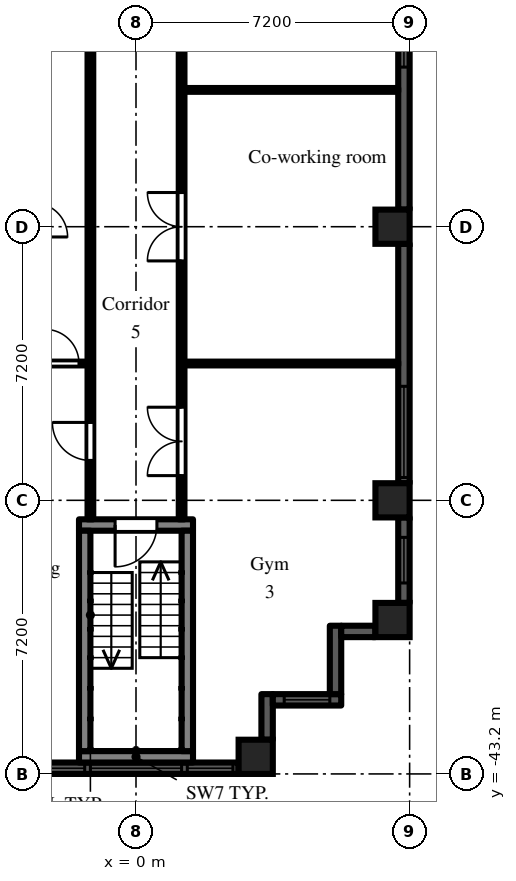
"""IFC4 building model, lengths in metres.
Left out: names, types, materials, properties, quantities, classifications, styles, units other than length and angle.
Written with IfcOpenShell. Run it as: python <this file> out.ifc"""

import sys

from ifc_helpers import new_model, si_unit, direction, frame, frame_2d, origin, origin_2d, place, context, subcontext, project, spatial, rectangle, extrude, element, fill, save


model = new_model("IFC4")
c1 = context("Model", 3, precision=1e-05, world=origin(), true_north=direction((0.0, 1.0)))
c2 = subcontext(c1, "Body", "Model", "MODEL_VIEW")
j1 = project(units=[si_unit("LENGTHUNIT", "METRE"), si_unit("PLANEANGLEUNIT", "RADIAN")], contexts=[c1])
p1 = place(None, origin())
s1 = spatial("IfcSite", under=j1, at=p1, CompositionType="ELEMENT")
p2 = place(p1, origin())
s2 = spatial("IfcBuilding", under=s1, at=p2, CompositionType="ELEMENT")
p3 = place(p2, frame((0.0, 0.0, 75.9)))
s3 = spatial("IfcBuildingStorey", under=s2, at=p3, CompositionType="ELEMENT", Elevation=75.9)
for number, where, z_axis, x_axis in (
    (1, (3.15, -42.75, 0.0), (0.0, 0.0, 1.0), (1.0, 0.0, 0.0)),
    (2, (6.75, -39.15, 0.0), (0.0, 0.0, 1.0), (1.0, 0.0, 0.0)),
    (3, (6.75, -36.0, 0.0), (0.0, 0.0, 1.0), (1.0, 0.0, 0.0)),
    (4, (6.75, -28.8, 0.0), (0.0, 0.0, 1.0), (1.0, 0.0, 0.0)),
):
    element("IfcColumn", number, at=place(p3, frame(where, z_axis=z_axis, x_axis=x_axis)), inside=s3, PredefinedType="COLUMN", context=c2, shape_type="SweptSolid", body=[
        extrude(rectangle(XDim=0.9, YDim=0.9, at=origin_2d()), origin(), (0.0, 0.0, 1.0), 3.0),
    ])
p4 = place(p3, frame((-2.7, -43.05, 0.0), z_axis=(0.0, 0.0, 1.0), x_axis=(1.0, 0.0, 0.0)))
e5 = element("IfcWall", 5, at=p4, inside=s3, PredefinedType="SOLIDWALL", context=c2, shape_type="SweptSolid", body=[
    extrude(rectangle(XDim=5.4, YDim=0.3, at=frame_2d((2.7, 0.0))), origin(), (0.0, 0.0, 1.0), 2.1),
])
p5 = place(p4, frame((1.5, 0.0, 0.2)))
e6 = element("IfcOpeningElement", 6, at=p5, cuts=e5, PredefinedType="OPENING", context=c2, shape_type="SweptSolid", body=[
    extrude(rectangle(XDim=2.4, YDim=1.85, at=frame_2d((1.2, 0.925))), frame((0.0, 0.16, 0.0), z_axis=(0.0, -1.0, 0.0), x_axis=(1.0, 0.0, 0.0)), (0.0, 0.0, 1.0), 0.32),
])
p6 = place(p4, frame((0.15, 0.0, 0.2)))
e7 = element("IfcOpeningElement", 7, at=p6, cuts=e5, PredefinedType="OPENING", context=c2, shape_type="SweptSolid", body=[
    extrude(rectangle(XDim=1.2, YDim=1.85, at=frame_2d((0.6, 0.925))), frame((0.0, 0.16, 0.0), z_axis=(0.0, -1.0, 0.0), x_axis=(1.0, 0.0, 0.0)), (0.0, 0.0, 1.0), 0.32),
])
p7 = place(p4, frame((4.05, 0.0, 0.2)))
e8 = element("IfcOpeningElement", 8, at=p7, cuts=e5, PredefinedType="OPENING", context=c2, shape_type="SweptSolid", body=[
    extrude(rectangle(XDim=1.2, YDim=1.85, at=frame_2d((0.6, 0.925))), frame((0.0, 0.16, 0.0), z_axis=(0.0, -1.0, 0.0), x_axis=(1.0, 0.0, 0.0)), (0.0, 0.0, 1.0), 0.32),
])
p8 = place(p3, frame((3.45, -42.3, 0.0), z_axis=(0.0, 0.0, 1.0), x_axis=(0.0, 1.0, 0.0)))
e9 = element("IfcWall", 9, at=p8, inside=s3, PredefinedType="SOLIDWALL", context=c2, shape_type="SweptSolid", body=[
    extrude(rectangle(XDim=1.2, YDim=0.3, at=frame_2d((0.6, 0.0))), origin(), (0.0, 0.0, 1.0), 2.575),
])
p9 = place(p3, frame((3.6, -41.25, 0.0), z_axis=(0.0, 0.0, 1.0), x_axis=(1.0, 0.0, 0.0)))
e10 = element("IfcWall", 10, at=p9, inside=s3, PredefinedType="SOLIDWALL", context=c2, shape_type="SweptSolid", body=[
    extrude(rectangle(XDim=1.8, YDim=0.3, at=frame_2d((0.9, 0.0))), origin(), (0.0, 0.0, 1.0), 2.575),
])
p10 = place(p9, frame((0.3, 0.0, 0.2)))
e11 = element("IfcOpeningElement", 11, at=p10, cuts=e10, PredefinedType="OPENING", context=c2, shape_type="SweptSolid", body=[
    extrude(rectangle(XDim=1.2, YDim=1.85, at=frame_2d((0.6, 0.925))), frame((0.0, 0.16, 0.0), z_axis=(0.0, -1.0, 0.0), x_axis=(1.0, 0.0, 0.0)), (0.0, 0.0, 1.0), 0.32),
])
p11 = place(p3, frame((5.25, -41.1, 0.0), z_axis=(0.0, 0.0, 1.0), x_axis=(0.0, 1.0, 0.0)))
e12 = element("IfcWall", 12, at=p11, inside=s3, PredefinedType="SOLIDWALL", context=c2, shape_type="SweptSolid", body=[
    extrude(rectangle(XDim=1.8, YDim=0.3, at=frame_2d((0.9, 0.0))), origin(), (0.0, 0.0, 1.0), 2.575),
])
p12 = place(p3, frame((5.4, -39.45, 0.0), z_axis=(0.0, 0.0, 1.0), x_axis=(1.0, 0.0, 0.0)))
e13 = element("IfcWall", 13, at=p12, inside=s3, PredefinedType="SOLIDWALL", context=c2, shape_type="SweptSolid", body=[
    extrude(rectangle(XDim=0.9, YDim=0.3, at=frame_2d((0.45, 0.0))), origin(), (0.0, 0.0, 1.0), 2.575),
])
p13 = place(p3, frame((7.05, -38.7, 0.0), z_axis=(0.0, 0.0, 1.0), x_axis=(0.0, 1.0, 0.0)))
e14 = element("IfcWall", 14, at=p13, inside=s3, PredefinedType="SOLIDWALL", context=c2, shape_type="SweptSolid", body=[
    extrude(rectangle(XDim=2.25, YDim=0.3, at=frame_2d((1.125, 0.0))), origin(), (0.0, 0.0, 1.0), 2.1),
])
p14 = place(p13, frame((0.525, 0.0, 0.2)))
e15 = element("IfcOpeningElement", 15, at=p14, cuts=e14, PredefinedType="OPENING", context=c2, shape_type="SweptSolid", body=[
    extrude(rectangle(XDim=1.2, YDim=1.85, at=frame_2d((0.6, 0.925))), frame((0.0, 0.16, 0.0), z_axis=(0.0, -1.0, 0.0), x_axis=(1.0, 0.0, 0.0)), (0.0, 0.0, 1.0), 0.32),
])
p15 = place(p3, frame((7.05, -35.55, 0.0), z_axis=(0.0, 0.0, 1.0), x_axis=(0.0, 1.0, 0.0)))
e16 = element("IfcWall", 16, at=p15, inside=s3, PredefinedType="SOLIDWALL", context=c2, shape_type="SweptSolid", body=[
    extrude(rectangle(XDim=6.3, YDim=0.3, at=frame_2d((3.15, 0.0))), origin(), (0.0, 0.0, 1.0), 2.1),
])
p16 = place(p15, frame((0.15, 0.0, 0.2)))
e17 = element("IfcOpeningElement", 17, at=p16, cuts=e16, PredefinedType="OPENING", context=c2, shape_type="SweptSolid", body=[
    extrude(rectangle(XDim=2.4, YDim=1.85, at=frame_2d((1.2, 0.925))), frame((0.0, 0.16, 0.0), z_axis=(0.0, -1.0, 0.0), x_axis=(1.0, 0.0, 0.0)), (0.0, 0.0, 1.0), 0.32),
])
p17 = place(p3, frame((7.05, -28.35, 0.0), z_axis=(0.0, 0.0, 1.0), x_axis=(0.0, 1.0, 0.0)))
e18 = element("IfcWall", 18, at=p17, inside=s3, PredefinedType="SOLIDWALL", context=c2, shape_type="SweptSolid", body=[
    extrude(rectangle(XDim=6.3, YDim=0.3, at=frame_2d((3.15, 0.0))), origin(), (0.0, 0.0, 1.0), 2.1),
])
p18 = place(p17, frame((3.75, 0.0, 0.2)))
e19 = element("IfcOpeningElement", 19, at=p18, cuts=e18, PredefinedType="OPENING", context=c2, shape_type="SweptSolid", body=[
    extrude(rectangle(XDim=2.4, YDim=1.85, at=frame_2d((1.2, 0.925))), frame((0.0, 0.16, 0.0), z_axis=(0.0, -1.0, 0.0), x_axis=(1.0, 0.0, 0.0)), (0.0, 0.0, 1.0), 0.32),
])
p19 = place(p3, frame((-1.5, -36.65, 0.0), z_axis=(0.0, 0.0, 1.0), x_axis=(1.0, 0.0, 0.0)))
e20 = element("IfcWall", 20, at=p19, inside=s3, PredefinedType="SHEAR", context=c2, shape_type="SweptSolid", body=[
    extrude(rectangle(XDim=3.0, YDim=0.3, at=frame_2d((1.5, 0.0))), origin(), (0.0, 0.0, 1.0), 2.575),
])
p20 = place(p19, frame((0.95, 0.0, 0.0)))
e21 = element("IfcOpeningElement", 21, at=p20, cuts=e20, PredefinedType="OPENING", context=c2, shape_type="SweptSolid", body=[
    extrude(rectangle(XDim=1.1, YDim=2.1, at=frame_2d((0.55, 1.05))), frame((0.0, 0.16, 0.0), z_axis=(0.0, -1.0, 0.0), x_axis=(1.0, 0.0, 0.0)), (0.0, 0.0, 1.0), 0.32),
])
p21 = place(p3, frame((-1.5, -42.75, 0.0), z_axis=(0.0, 0.0, 1.0), x_axis=(1.0, 0.0, 0.0)))
e22 = element("IfcWall", 22, at=p21, inside=s3, PredefinedType="SHEAR", context=c2, shape_type="SweptSolid", body=[
    extrude(rectangle(XDim=3.0, YDim=0.3, at=frame_2d((1.5, 0.0))), origin(), (0.0, 0.0, 1.0), 2.575),
])
for number, where, z_axis, x_axis in (
    (23, (-1.35, -36.8, 0.0), (0.0, 0.0, 1.0), (0.0, -1.0, 0.0)),
    (24, (1.35, -36.8, 0.0), (0.0, 0.0, 1.0), (0.0, -1.0, 0.0)),
):
    element("IfcWall", number, at=place(p3, frame(where, z_axis=z_axis, x_axis=x_axis)), inside=s3, PredefinedType="SHEAR", context=c2, shape_type="SweptSolid", body=[
        extrude(rectangle(XDim=5.8, YDim=0.3, at=frame_2d((2.9, 0.0))), origin(), (0.0, 0.0, 1.0), 2.575),
    ])
p22 = place(p3, frame((-6.9, -32.4, 0.0), z_axis=(0.0, 0.0, 1.0), x_axis=(1.0, 0.0, 0.0)))
e25 = element("IfcWall", 25, at=p22, inside=s3, PredefinedType="PARTITIONING", context=c2, shape_type="SweptSolid", body=[
    extrude(rectangle(XDim=5.625, YDim=0.1, at=frame_2d((2.812, 0.0))), origin(), (0.0, 0.0, 1.0), 2.575),
])
p23 = place(p22, frame((4.5, 0.0, 0.0)))
e26 = element("IfcOpeningElement", 26, at=p23, cuts=e25, PredefinedType="OPENING", context=c2, shape_type="SweptSolid", body=[
    extrude(rectangle(XDim=0.9, YDim=2.1, at=frame_2d((0.45, 1.05))), frame((0.0, 0.06, 0.0), z_axis=(0.0, -1.0, 0.0), x_axis=(1.0, 0.0, 0.0)), (0.0, 0.0, 1.0), 0.12),
])
p24 = place(p3, frame((-1.2, -36.5, 0.0), z_axis=(0.0, 0.0, 1.0), x_axis=(0.0, 1.0, 0.0)))
e27 = element("IfcWall", 27, at=p24, inside=s3, PredefinedType="PARTITIONING", context=c2, shape_type="SweptSolid", body=[
    extrude(rectangle(XDim=35.225, YDim=0.15, at=frame_2d((17.613, 0.0))), origin(), (0.0, 0.0, 1.0), 2.575),
])
p25 = place(p24, frame((23.05, 0.0, 0.0)))
e28 = element("IfcOpeningElement", 28, at=p25, cuts=e27, PredefinedType="OPENING", context=c2, shape_type="SweptSolid", body=[
    extrude(rectangle(XDim=0.9, YDim=2.1, at=frame_2d((0.45, 1.05))), frame((0.0, 0.085, 0.0), z_axis=(0.0, -1.0, 0.0), x_axis=(1.0, 0.0, 0.0)), (0.0, 0.0, 1.0), 0.17),
])
p26 = place(p24, frame((26.65, 0.0, 0.0)))
e29 = element("IfcOpeningElement", 29, at=p26, cuts=e27, PredefinedType="OPENING", context=c2, shape_type="SweptSolid", body=[
    extrude(rectangle(XDim=0.9, YDim=2.1, at=frame_2d((0.45, 1.05))), frame((0.0, 0.085, 0.0), z_axis=(0.0, -1.0, 0.0), x_axis=(1.0, 0.0, 0.0)), (0.0, 0.0, 1.0), 0.17),
])
p27 = place(p24, frame((20.75, 0.0, 0.0)))
e30 = element("IfcOpeningElement", 30, at=p27, cuts=e27, PredefinedType="OPENING", context=c2, shape_type="SweptSolid", body=[
    extrude(rectangle(XDim=0.9, YDim=2.1, at=frame_2d((0.45, 1.05))), frame((0.0, 0.085, 0.0), z_axis=(0.0, -1.0, 0.0), x_axis=(1.0, 0.0, 0.0)), (0.0, 0.0, 1.0), 0.17),
])
p28 = place(p24, frame((18.95, 0.0, 0.0)))
e31 = element("IfcOpeningElement", 31, at=p28, cuts=e27, PredefinedType="OPENING", context=c2, shape_type="SweptSolid", body=[
    extrude(rectangle(XDim=0.9, YDim=2.1, at=frame_2d((0.45, 1.05))), frame((0.0, 0.085, 0.0), z_axis=(0.0, -1.0, 0.0), x_axis=(1.0, 0.0, 0.0)), (0.0, 0.0, 1.0), 0.17),
])
p29 = place(p24, frame((1.55, 0.0, 0.0)))
e32 = element("IfcOpeningElement", 32, at=p29, cuts=e27, PredefinedType="OPENING", context=c2, shape_type="SweptSolid", body=[
    extrude(rectangle(XDim=1.0, YDim=2.1, at=frame_2d((0.5, 1.05))), frame((0.0, 0.085, 0.0), z_axis=(0.0, -1.0, 0.0), x_axis=(1.0, 0.0, 0.0)), (0.0, 0.0, 1.0), 0.17),
])
p30 = place(p3, frame((1.2, -36.5, 0.0), z_axis=(0.0, 0.0, 1.0), x_axis=(0.0, 1.0, 0.0)))
e33 = element("IfcWall", 33, at=p30, inside=s3, PredefinedType="PARTITIONING", context=c2, shape_type="SweptSolid", body=[
    extrude(rectangle(XDim=35.375, YDim=0.15, at=frame_2d((17.688, 0.0))), origin(), (0.0, 0.0, 1.0), 2.575),
])
p31 = place(p30, frame((33.65, 0.0, 0.0)))
e34 = element("IfcOpeningElement", 34, at=p31, cuts=e33, PredefinedType="OPENING", context=c2, shape_type="SweptSolid", body=[
    extrude(rectangle(XDim=0.9, YDim=2.1, at=frame_2d((0.45, 1.05))), frame((0.0, 0.085, 0.0), z_axis=(0.0, -1.0, 0.0), x_axis=(1.0, 0.0, 0.0)), (0.0, 0.0, 1.0), 0.17),
])
p32 = place(p30, frame((30.65, 0.0, 0.0)))
e35 = element("IfcOpeningElement", 35, at=p32, cuts=e33, PredefinedType="OPENING", context=c2, shape_type="SweptSolid", body=[
    extrude(rectangle(XDim=0.9, YDim=2.1, at=frame_2d((0.45, 1.05))), frame((0.0, 0.085, 0.0), z_axis=(0.0, -1.0, 0.0), x_axis=(1.0, 0.0, 0.0)), (0.0, 0.0, 1.0), 0.17),
])
p33 = place(p30, frame((23.05, 0.0, 0.0)))
e36 = element("IfcOpeningElement", 36, at=p33, cuts=e33, PredefinedType="OPENING", context=c2, shape_type="SweptSolid", body=[
    extrude(rectangle(XDim=0.9, YDim=2.1, at=frame_2d((0.45, 1.05))), frame((0.0, 0.085, 0.0), z_axis=(0.0, -1.0, 0.0), x_axis=(1.0, 0.0, 0.0)), (0.0, 0.0, 1.0), 0.17),
])
p34 = place(p30, frame((26.65, 0.0, 0.0)))
e37 = element("IfcOpeningElement", 37, at=p34, cuts=e33, PredefinedType="OPENING", context=c2, shape_type="SweptSolid", body=[
    extrude(rectangle(XDim=0.9, YDim=2.1, at=frame_2d((0.45, 1.05))), frame((0.0, 0.085, 0.0), z_axis=(0.0, -1.0, 0.0), x_axis=(1.0, 0.0, 0.0)), (0.0, 0.0, 1.0), 0.17),
])
p35 = place(p30, frame((20.5, 0.0, 0.0)))
e38 = element("IfcOpeningElement", 38, at=p35, cuts=e33, PredefinedType="OPENING", context=c2, shape_type="SweptSolid", body=[
    extrude(rectangle(XDim=1.0, YDim=2.1, at=frame_2d((0.5, 1.05))), frame((0.0, 0.085, 0.0), z_axis=(0.0, -1.0, 0.0), x_axis=(1.0, 0.0, 0.0)), (0.0, 0.0, 1.0), 0.17),
])
p36 = place(p30, frame((14.0, 0.0, 0.0)))
e39 = element("IfcOpeningElement", 39, at=p36, cuts=e33, PredefinedType="OPENING", context=c2, shape_type="SweptSolid", body=[
    extrude(rectangle(XDim=1.8, YDim=2.1, at=frame_2d((0.9, 1.05))), frame((0.0, 0.085, 0.0), z_axis=(0.0, -1.0, 0.0), x_axis=(1.0, 0.0, 0.0)), (0.0, 0.0, 1.0), 0.17),
])
p37 = place(p30, frame((6.8, 0.0, 0.0)))
e40 = element("IfcOpeningElement", 40, at=p37, cuts=e33, PredefinedType="OPENING", context=c2, shape_type="SweptSolid", body=[
    extrude(rectangle(XDim=1.8, YDim=2.1, at=frame_2d((0.9, 1.05))), frame((0.0, 0.085, 0.0), z_axis=(0.0, -1.0, 0.0), x_axis=(1.0, 0.0, 0.0)), (0.0, 0.0, 1.0), 0.17),
])
p38 = place(p30, frame((1.15, 0.0, 0.0)))
e41 = element("IfcOpeningElement", 41, at=p38, cuts=e33, PredefinedType="OPENING", context=c2, shape_type="SweptSolid", body=[
    extrude(rectangle(XDim=1.8, YDim=2.1, at=frame_2d((0.9, 1.05))), frame((0.0, 0.085, 0.0), z_axis=(0.0, -1.0, 0.0), x_axis=(1.0, 0.0, 0.0)), (0.0, 0.0, 1.0), 0.17),
])
for number, where, z_axis, x_axis in (
    (42, (1.275, -32.4, 0.0), (0.0, 0.0, 1.0), (1.0, 0.0, 0.0)),
    (43, (1.275, -25.2, 0.0), (0.0, 0.0, 1.0), (1.0, 0.0, 0.0)),
):
    element("IfcWall", number, at=place(p3, frame(where, z_axis=z_axis, x_axis=x_axis)), inside=s3, PredefinedType="PARTITIONING", context=c2, shape_type="SweptSolid", body=[
        extrude(rectangle(XDim=5.625, YDim=0.1, at=frame_2d((2.812, 0.0))), origin(), (0.0, 0.0, 1.0), 2.575),
    ])
p39 = place(p5, origin())
e44 = element("IfcWindow", 44, at=p39, inside=s3, PartitioningType="SINGLE_PANEL", PredefinedType="WINDOW", context=c2, shape_type="SweptSolid", body=[
    extrude(rectangle(XDim=2.4, YDim=1.85, at=frame_2d((1.2, 0.925))), frame((0.0, 0.03, 0.0), z_axis=(0.0, -1.0, 0.0), x_axis=(1.0, 0.0, 0.0)), (0.0, 0.0, 1.0), 0.06),
])
fill(e6, e44)
p40 = place(p6, origin())
e45 = element("IfcWindow", 45, at=p40, inside=s3, PartitioningType="SINGLE_PANEL", PredefinedType="WINDOW", context=c2, shape_type="SweptSolid", body=[
    extrude(rectangle(XDim=1.2, YDim=1.85, at=frame_2d((0.6, 0.925))), frame((0.0, 0.03, 0.0), z_axis=(0.0, -1.0, 0.0), x_axis=(1.0, 0.0, 0.0)), (0.0, 0.0, 1.0), 0.06),
])
fill(e7, e45)
p41 = place(p7, origin())
e46 = element("IfcWindow", 46, at=p41, inside=s3, PartitioningType="SINGLE_PANEL", PredefinedType="WINDOW", context=c2, shape_type="SweptSolid", body=[
    extrude(rectangle(XDim=1.2, YDim=1.85, at=frame_2d((0.6, 0.925))), frame((0.0, 0.03, 0.0), z_axis=(0.0, -1.0, 0.0), x_axis=(1.0, 0.0, 0.0)), (0.0, 0.0, 1.0), 0.06),
])
fill(e8, e46)
p42 = place(p10, origin())
e47 = element("IfcWindow", 47, at=p42, inside=s3, PartitioningType="SINGLE_PANEL", PredefinedType="WINDOW", context=c2, shape_type="SweptSolid", body=[
    extrude(rectangle(XDim=1.2, YDim=1.85, at=frame_2d((0.6, 0.925))), frame((0.0, 0.03, 0.0), z_axis=(0.0, -1.0, 0.0), x_axis=(1.0, 0.0, 0.0)), (0.0, 0.0, 1.0), 0.06),
])
fill(e11, e47)
p43 = place(p14, origin())
e48 = element("IfcWindow", 48, at=p43, inside=s3, PartitioningType="SINGLE_PANEL", PredefinedType="WINDOW", context=c2, shape_type="SweptSolid", body=[
    extrude(rectangle(XDim=1.2, YDim=1.85, at=frame_2d((0.6, 0.925))), frame((0.0, 0.03, 0.0), z_axis=(0.0, -1.0, 0.0), x_axis=(1.0, 0.0, 0.0)), (0.0, 0.0, 1.0), 0.06),
])
fill(e15, e48)
p44 = place(p16, origin())
e49 = element("IfcWindow", 49, at=p44, inside=s3, PartitioningType="SINGLE_PANEL", PredefinedType="WINDOW", context=c2, shape_type="SweptSolid", body=[
    extrude(rectangle(XDim=2.4, YDim=1.85, at=frame_2d((1.2, 0.925))), frame((0.0, 0.03, 0.0), z_axis=(0.0, -1.0, 0.0), x_axis=(1.0, 0.0, 0.0)), (0.0, 0.0, 1.0), 0.06),
])
fill(e17, e49)
p45 = place(p18, origin())
e50 = element("IfcWindow", 50, at=p45, inside=s3, PartitioningType="SINGLE_PANEL", PredefinedType="WINDOW", context=c2, shape_type="SweptSolid", body=[
    extrude(rectangle(XDim=2.4, YDim=1.85, at=frame_2d((1.2, 0.925))), frame((0.0, 0.03, 0.0), z_axis=(0.0, -1.0, 0.0), x_axis=(1.0, 0.0, 0.0)), (0.0, 0.0, 1.0), 0.06),
])
fill(e19, e50)
p46 = place(p20, frame((1.1, 0.0, 0.0), z_axis=(0.0, 0.0, 1.0), x_axis=(-1.0, 0.0, 0.0)))
e51 = element("IfcDoor", 51, at=p46, inside=s3, OperationType="SINGLE_SWING_RIGHT", PredefinedType="DOOR", context=c2, shape_type="SweptSolid", body=[
    extrude(rectangle(XDim=1.1, YDim=2.1, at=frame_2d((0.55, 1.05))), frame((0.0, 0.025, 0.0), z_axis=(0.0, -1.0, 0.0), x_axis=(1.0, 0.0, 0.0)), (0.0, 0.0, 1.0), 0.05),
])
fill(e21, e51)
p47 = place(p37, origin())
e52 = element("IfcDoor", 52, at=p47, inside=s3, OperationType="DOUBLE_DOOR_DOUBLE_SWING", PredefinedType="DOOR", context=c2, shape_type="SweptSolid", body=[
    extrude(rectangle(XDim=1.8, YDim=2.1, at=frame_2d((0.9, 1.05))), frame((0.0, 0.025, 0.0), z_axis=(0.0, -1.0, 0.0), x_axis=(1.0, 0.0, 0.0)), (0.0, 0.0, 1.0), 0.05),
])
fill(e40, e52)
p48 = place(p38, origin())
e53 = element("IfcDoor", 53, at=p48, inside=s3, OperationType="DOUBLE_DOOR_DOUBLE_SWING", PredefinedType="DOOR", context=c2, shape_type="SweptSolid", body=[
    extrude(rectangle(XDim=1.8, YDim=2.1, at=frame_2d((0.9, 1.05))), frame((0.0, 0.025, 0.0), z_axis=(0.0, -1.0, 0.0), x_axis=(1.0, 0.0, 0.0)), (0.0, 0.0, 1.0), 0.05),
])
fill(e41, e53)
p49 = place(p29, origin())
e54 = element("IfcDoor", 54, at=p49, inside=s3, OperationType="SINGLE_SWING_RIGHT", PredefinedType="DOOR", context=c2, shape_type="SweptSolid", body=[
    extrude(rectangle(XDim=1.0, YDim=2.1, at=frame_2d((0.5, 1.05))), frame((0.0, 0.025, 0.0), z_axis=(0.0, -1.0, 0.0), x_axis=(1.0, 0.0, 0.0)), (0.0, 0.0, 1.0), 0.05),
])
fill(e32, e54)
p50 = place(p23, origin())
e55 = element("IfcDoor", 55, at=p50, inside=s3, OperationType="SINGLE_SWING_LEFT", PredefinedType="DOOR", context=c2, shape_type="SweptSolid", body=[
    extrude(rectangle(XDim=0.9, YDim=2.1, at=frame_2d((0.45, 1.05))), frame((0.0, 0.025, 0.0), z_axis=(0.0, -1.0, 0.0), x_axis=(1.0, 0.0, 0.0)), (0.0, 0.0, 1.0), 0.05),
])
fill(e26, e55)
save(model, sys.argv[1])
